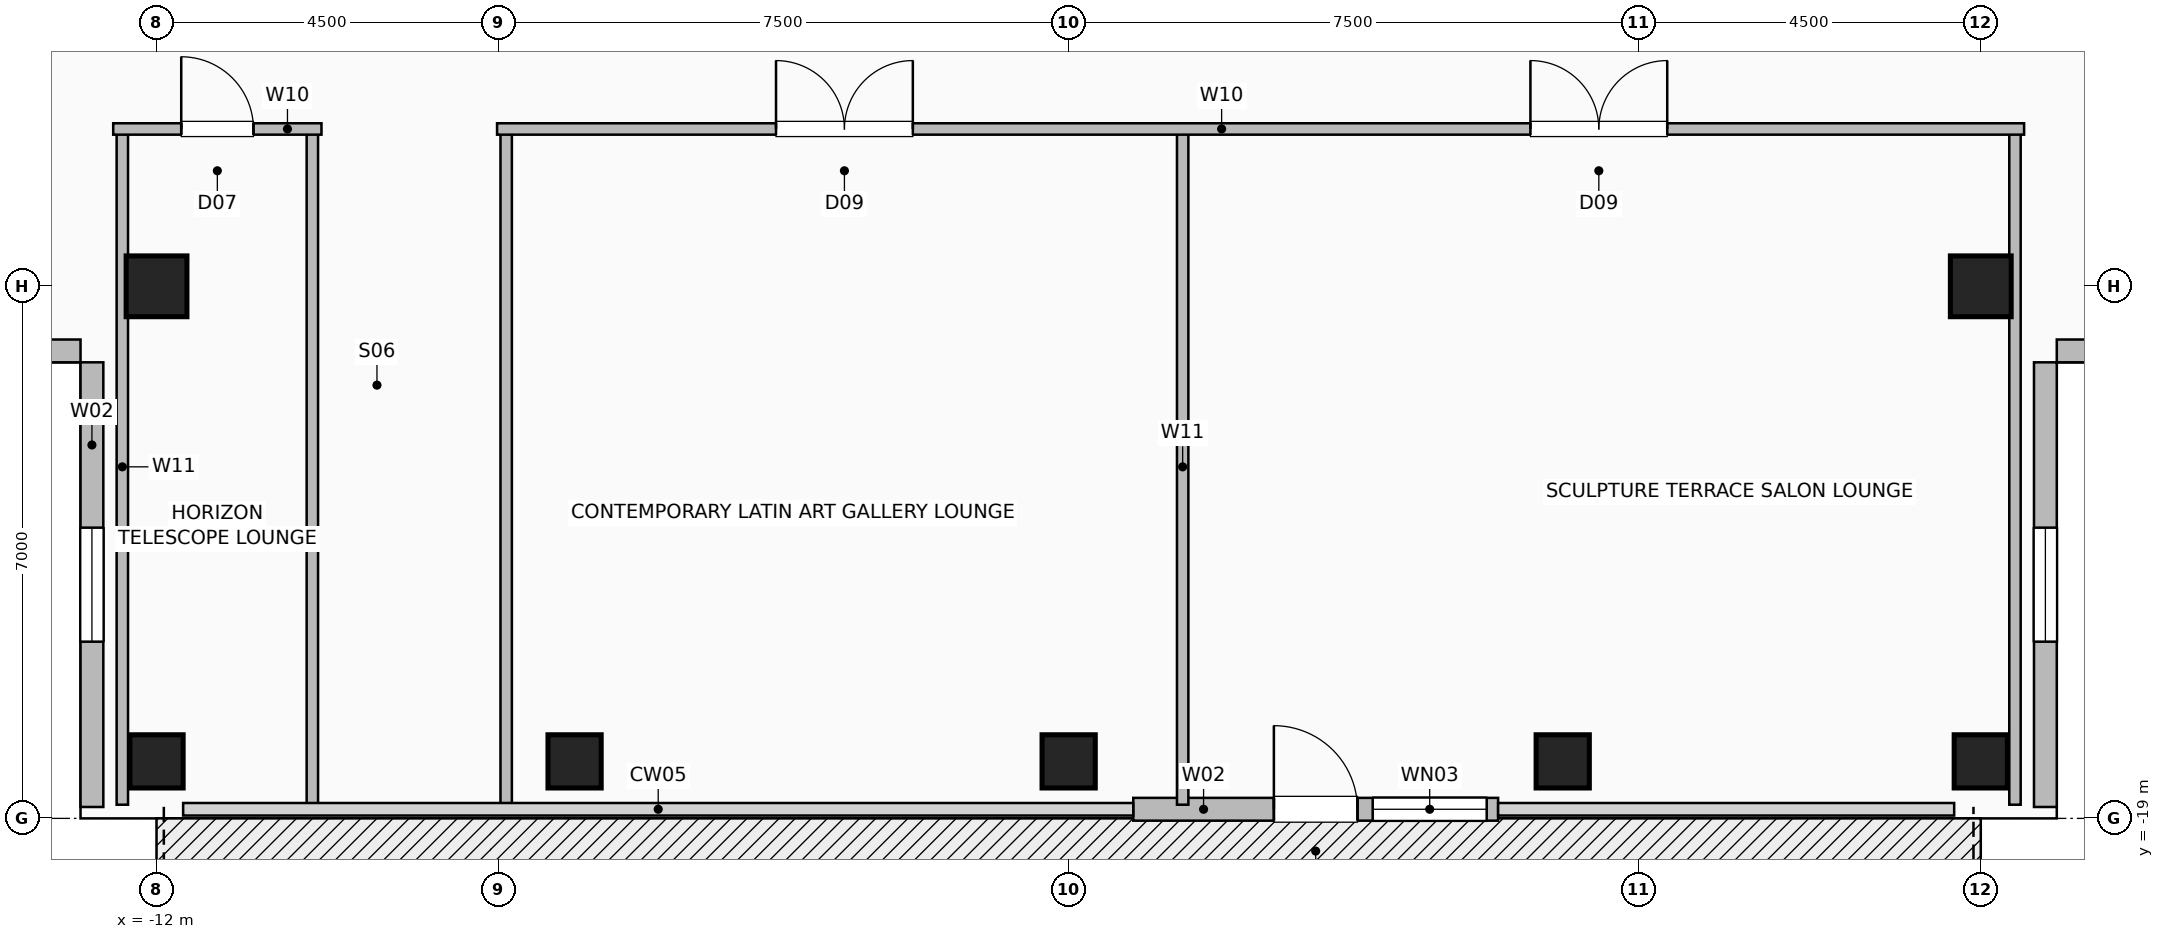
"""IFC4 building model, lengths in metres.
Left out: names, types, materials, properties, quantities, classifications, styles, units other than length and angle.
Written with IfcOpenShell. Run it as: python <this file> out.ifc"""

import sys

from ifc_helpers import new_model, si_unit, direction, frame, frame_2d, origin, origin_2d, place, context, subcontext, project, spatial, rectangle, hollow_rectangle, extrude, element, fill, save


model = new_model("IFC4")
c1 = context("Model", 3, precision=1e-05, world=origin(), true_north=direction((0.0, 1.0)))
c2 = subcontext(c1, "Body", "Model", "MODEL_VIEW")
j1 = project(units=[si_unit("LENGTHUNIT", "METRE"), si_unit("PLANEANGLEUNIT", "RADIAN")], contexts=[c1])
p1 = place(None, origin())
s1 = spatial("IfcSite", under=j1, at=p1, CompositionType="ELEMENT")
p2 = place(p1, origin())
s2 = spatial("IfcBuilding", under=s1, at=p2, CompositionType="ELEMENT")
p3 = place(p2, frame((0.0, 0.0, 264.8)))
s3 = spatial("IfcBuildingStorey", under=s2, at=p3, CompositionType="ELEMENT", Elevation=264.8)
for number, where, z_axis, x_axis in (
    (1, (-12.0, -18.25, 0.0), (0.0, 0.0, 1.0), (1.0, 0.0, 0.0)),
    (2, (-6.5, -18.25, 0.0), (0.0, 0.0, 1.0), (1.0, 0.0, 0.0)),
    (3, (0.0, -18.25, 0.0), (0.0, 0.0, 1.0), (1.0, 0.0, 0.0)),
    (4, (6.5, -18.25, 0.0), (0.0, 0.0, 1.0), (1.0, 0.0, 0.0)),
    (5, (12.0, -18.25, 0.0), (0.0, 0.0, 1.0), (1.0, 0.0, 0.0)),
):
    element("IfcColumn", number, at=place(p3, frame(where, z_axis=z_axis, x_axis=x_axis)), inside=s3, PredefinedType="COLUMN", context=c2, shape_type="SweptSolid", body=[
        extrude(hollow_rectangle(XDim=0.7, YDim=0.7, WallThickness=0.035, at=origin_2d()), origin(), (0.0, 0.0, 1.0), 3.6),
    ])
for number, where, z_axis, x_axis in (
    (6, (-12.0, -12.0, 0.0), (0.0, 0.0, 1.0), (1.0, 0.0, 0.0)),
    (7, (12.0, -12.0, 0.0), (0.0, 0.0, 1.0), (1.0, 0.0, 0.0)),
):
    element("IfcColumn", number, at=place(p3, frame(where, z_axis=z_axis, x_axis=x_axis)), inside=s3, PredefinedType="COLUMN", context=c2, shape_type="SweptSolid", body=[
        extrude(hollow_rectangle(XDim=0.8, YDim=0.8, WallThickness=0.04, at=origin_2d()), origin(), (0.0, 0.0, 1.0), 3.6),
    ])
p4 = place(p3, frame((0.85, -18.88, 0.0), z_axis=(0.0, 0.0, 1.0), x_axis=(1.0, 0.0, 0.0)))
e8 = element("IfcWall", 8, at=p4, inside=s3, PredefinedType="SOLIDWALL", context=c2, shape_type="SweptSolid", body=[
    extrude(rectangle(XDim=4.8, YDim=0.3, at=frame_2d((2.4, 0.0))), origin(), (0.0, 0.0, 1.0), 3.36),
])
p5 = place(p4, frame((1.85, 0.0, 0.0)))
e9 = element("IfcOpeningElement", 9, at=p5, cuts=e8, PredefinedType="OPENING", context=c2, shape_type="SweptSolid", body=[
    extrude(rectangle(XDim=1.1, YDim=2.2, at=frame_2d((0.55, 1.1))), frame((0.0, 0.16, 0.0), z_axis=(0.0, -1.0, 0.0), x_axis=(1.0, 0.0, 0.0)), (0.0, 0.0, 1.0), 0.32),
])
p6 = place(p4, frame((3.15, 0.0, 0.85)))
e10 = element("IfcOpeningElement", 10, at=p6, cuts=e8, PredefinedType="OPENING", context=c2, shape_type="SweptSolid", body=[
    extrude(rectangle(XDim=1.5, YDim=1.8, at=frame_2d((0.75, 0.9))), frame((0.0, 0.16, 0.0), z_axis=(0.0, -1.0, 0.0), x_axis=(1.0, 0.0, 0.0)), (0.0, 0.0, 1.0), 0.32),
])
p7 = place(p3, frame((-12.85, -18.85, 0.0), z_axis=(0.0, 0.0, 1.0), x_axis=(0.0, 1.0, 0.0)))
e11 = element("IfcWall", 11, at=p7, inside=s3, PredefinedType="SOLIDWALL", context=c2, shape_type="SweptSolid", body=[
    extrude(rectangle(XDim=5.85, YDim=0.3, at=frame_2d((2.925, 0.0))), origin(), (0.0, 0.0, 1.0), 3.36),
])
p8 = place(p7, frame((2.175, 0.0, 0.9)))
e12 = element("IfcOpeningElement", 12, at=p8, cuts=e11, PredefinedType="OPENING", context=c2, shape_type="SweptSolid", body=[
    extrude(rectangle(XDim=1.5, YDim=1.8, at=frame_2d((0.75, 0.9))), frame((0.0, 0.16, 0.0), z_axis=(0.0, -1.0, 0.0), x_axis=(1.0, 0.0, 0.0)), (0.0, 0.0, 1.0), 0.32),
])
p9 = place(p3, frame((-18.85, -12.85, 0.0), z_axis=(0.0, 0.0, 1.0), x_axis=(1.0, 0.0, 0.0)))
e13 = element("IfcWall", 13, at=p9, inside=s3, PredefinedType="SOLIDWALL", context=c2, shape_type="SweptSolid", body=[
    extrude(rectangle(XDim=5.85, YDim=0.3, at=frame_2d((2.925, 0.0))), origin(), (0.0, 0.0, 1.0), 3.36),
])
p10 = place(p3, frame((12.85, -18.85, 0.0), z_axis=(0.0, 0.0, 1.0), x_axis=(0.0, 1.0, 0.0)))
e14 = element("IfcWall", 14, at=p10, inside=s3, PredefinedType="SOLIDWALL", context=c2, shape_type="SweptSolid", body=[
    extrude(rectangle(XDim=5.85, YDim=0.3, at=frame_2d((2.925, 0.0))), origin(), (0.0, 0.0, 1.0), 3.36),
])
p11 = place(p10, frame((2.175, 0.0, 0.9)))
e15 = element("IfcOpeningElement", 15, at=p11, cuts=e14, PredefinedType="OPENING", context=c2, shape_type="SweptSolid", body=[
    extrude(rectangle(XDim=1.5, YDim=1.8, at=frame_2d((0.75, 0.9))), frame((0.0, 0.16, 0.0), z_axis=(0.0, -1.0, 0.0), x_axis=(1.0, 0.0, 0.0)), (0.0, 0.0, 1.0), 0.32),
])
p12 = place(p3, frame((18.85, -12.85, 0.0), z_axis=(0.0, 0.0, 1.0), x_axis=(-1.0, 0.0, 0.0)))
e16 = element("IfcWall", 16, at=p12, inside=s3, PredefinedType="SOLIDWALL", context=c2, shape_type="SweptSolid", body=[
    extrude(rectangle(XDim=5.85, YDim=0.3, at=frame_2d((2.925, 0.0))), origin(), (0.0, 0.0, 1.0), 3.36),
])
for number, where, z_axis, x_axis in (
    (17, (-12.45, -18.82, 0.0), (0.0, 0.0, 1.0), (0.0, 1.0, 0.0)),
    (18, (-9.95, -18.82, 0.0), (0.0, 0.0, 1.0), (0.0, 1.0, 0.0)),
):
    element("IfcWall", number, at=place(p3, frame(where, z_axis=z_axis, x_axis=x_axis)), inside=s3, PredefinedType="PARTITIONING", context=c2, shape_type="SweptSolid", body=[
        extrude(rectangle(XDim=8.89, YDim=0.15, at=frame_2d((4.445, 0.0))), origin(), (0.0, 0.0, 1.0), 3.36),
    ])
p13 = place(p3, frame((-12.57, -9.93, 0.0), z_axis=(0.0, 0.0, 1.0), x_axis=(1.0, 0.0, 0.0)))
e19 = element("IfcWall", 19, at=p13, inside=s3, PredefinedType="PARTITIONING", context=c2, shape_type="SweptSolid", body=[
    extrude(rectangle(XDim=2.74, YDim=0.15, at=frame_2d((1.37, 0.0))), origin(), (0.0, 0.0, 1.0), 3.36),
])
p14 = place(p13, frame((0.895, 0.0, 0.0)))
e20 = element("IfcOpeningElement", 20, at=p14, cuts=e19, PredefinedType="OPENING", context=c2, shape_type="SweptSolid", body=[
    extrude(rectangle(XDim=0.95, YDim=2.06, at=frame_2d((0.475, 1.03))), frame((0.0, 0.085, 0.0), z_axis=(0.0, -1.0, 0.0), x_axis=(1.0, 0.0, 0.0)), (0.0, 0.0, 1.0), 0.17),
])
for number, where, z_axis, x_axis in (
    (21, (-7.4, -18.82, 0.0), (0.0, 0.0, 1.0), (0.0, 1.0, 0.0)),
    (22, (1.5, -18.82, 0.0), (0.0, 0.0, 1.0), (0.0, 1.0, 0.0)),
    (23, (12.45, -18.82, 0.0), (0.0, 0.0, 1.0), (0.0, 1.0, 0.0)),
):
    element("IfcWall", number, at=place(p3, frame(where, z_axis=z_axis, x_axis=x_axis)), inside=s3, PredefinedType="PARTITIONING", context=c2, shape_type="SweptSolid", body=[
        extrude(rectangle(XDim=8.89, YDim=0.15, at=frame_2d((4.445, 0.0))), origin(), (0.0, 0.0, 1.0), 3.36),
    ])
p15 = place(p3, frame((-7.52, -9.93, 0.0), z_axis=(0.0, 0.0, 1.0), x_axis=(1.0, 0.0, 0.0)))
e24 = element("IfcWall", 24, at=p15, inside=s3, PredefinedType="PARTITIONING", context=c2, shape_type="SweptSolid", body=[
    extrude(rectangle(XDim=20.09, YDim=0.15, at=frame_2d((10.045, 0.0))), origin(), (0.0, 0.0, 1.0), 3.36),
])
p16 = place(p15, frame((3.67, 0.0, 0.0)))
e25 = element("IfcOpeningElement", 25, at=p16, cuts=e24, PredefinedType="OPENING", context=c2, shape_type="SweptSolid", body=[
    extrude(rectangle(XDim=1.8, YDim=2.08, at=frame_2d((0.9, 1.04))), frame((0.0, 0.085, 0.0), z_axis=(0.0, -1.0, 0.0), x_axis=(1.0, 0.0, 0.0)), (0.0, 0.0, 1.0), 0.17),
])
p17 = place(p15, frame((13.595, 0.0, 0.0)))
e26 = element("IfcOpeningElement", 26, at=p17, cuts=e24, PredefinedType="OPENING", context=c2, shape_type="SweptSolid", body=[
    extrude(rectangle(XDim=1.8, YDim=2.08, at=frame_2d((0.9, 1.04))), frame((0.0, 0.085, 0.0), z_axis=(0.0, -1.0, 0.0), x_axis=(1.0, 0.0, 0.0)), (0.0, 0.0, 1.0), 0.17),
])
p18 = place(p5, origin())
e27 = element("IfcDoor", 27, at=p18, inside=s3, OperationType="SINGLE_SWING_LEFT", PredefinedType="DOOR", context=c2, shape_type="SweptSolid", body=[
    extrude(rectangle(XDim=1.1, YDim=2.2, at=frame_2d((0.55, 1.1))), frame((0.0, 0.025, 0.0), z_axis=(0.0, -1.0, 0.0), x_axis=(1.0, 0.0, 0.0)), (0.0, 0.0, 1.0), 0.05),
])
fill(e9, e27)
p19 = place(p6, origin())
e28 = element("IfcWindow", 28, at=p19, inside=s3, PartitioningType="SINGLE_PANEL", PredefinedType="WINDOW", context=c2, shape_type="SweptSolid", body=[
    extrude(rectangle(XDim=1.5, YDim=1.8, at=frame_2d((0.75, 0.9))), frame((0.0, 0.03, 0.0), z_axis=(0.0, -1.0, 0.0), x_axis=(1.0, 0.0, 0.0)), (0.0, 0.0, 1.0), 0.06),
])
fill(e10, e28)
p20 = place(p8, origin())
e29 = element("IfcWindow", 29, at=p20, inside=s3, PartitioningType="SINGLE_PANEL", PredefinedType="WINDOW", context=c2, shape_type="SweptSolid", body=[
    extrude(rectangle(XDim=1.5, YDim=1.8, at=frame_2d((0.75, 0.9))), frame((0.0, 0.03, 0.0), z_axis=(0.0, -1.0, 0.0), x_axis=(1.0, 0.0, 0.0)), (0.0, 0.0, 1.0), 0.06),
])
fill(e12, e29)
p21 = place(p11, origin())
e30 = element("IfcWindow", 30, at=p21, inside=s3, PartitioningType="SINGLE_PANEL", PredefinedType="WINDOW", context=c2, shape_type="SweptSolid", body=[
    extrude(rectangle(XDim=1.5, YDim=1.8, at=frame_2d((0.75, 0.9))), frame((0.0, 0.03, 0.0), z_axis=(0.0, -1.0, 0.0), x_axis=(1.0, 0.0, 0.0)), (0.0, 0.0, 1.0), 0.06),
])
fill(e15, e30)
p22 = place(p14, origin())
e31 = element("IfcDoor", 31, at=p22, inside=s3, OperationType="SINGLE_SWING_LEFT", PredefinedType="DOOR", context=c2, shape_type="SweptSolid", body=[
    extrude(rectangle(XDim=0.95, YDim=2.06, at=frame_2d((0.475, 1.03))), frame((0.0, 0.025, 0.0), z_axis=(0.0, -1.0, 0.0), x_axis=(1.0, 0.0, 0.0)), (0.0, 0.0, 1.0), 0.05),
])
fill(e20, e31)
p23 = place(p16, origin())
e32 = element("IfcDoor", 32, at=p23, inside=s3, OperationType="DOUBLE_DOOR_SINGLE_SWING", PredefinedType="DOOR", context=c2, shape_type="SweptSolid", body=[
    extrude(rectangle(XDim=1.8, YDim=2.08, at=frame_2d((0.9, 1.04))), frame((0.0, 0.025, 0.0), z_axis=(0.0, -1.0, 0.0), x_axis=(1.0, 0.0, 0.0)), (0.0, 0.0, 1.0), 0.05),
])
fill(e25, e32)
p24 = place(p17, origin())
e33 = element("IfcDoor", 33, at=p24, inside=s3, OperationType="DOUBLE_DOOR_SINGLE_SWING", PredefinedType="DOOR", context=c2, shape_type="SweptSolid", body=[
    extrude(rectangle(XDim=1.8, YDim=2.08, at=frame_2d((0.9, 1.04))), frame((0.0, 0.025, 0.0), z_axis=(0.0, -1.0, 0.0), x_axis=(1.0, 0.0, 0.0)), (0.0, 0.0, 1.0), 0.05),
])
fill(e26, e33)
save(model, sys.argv[1])
